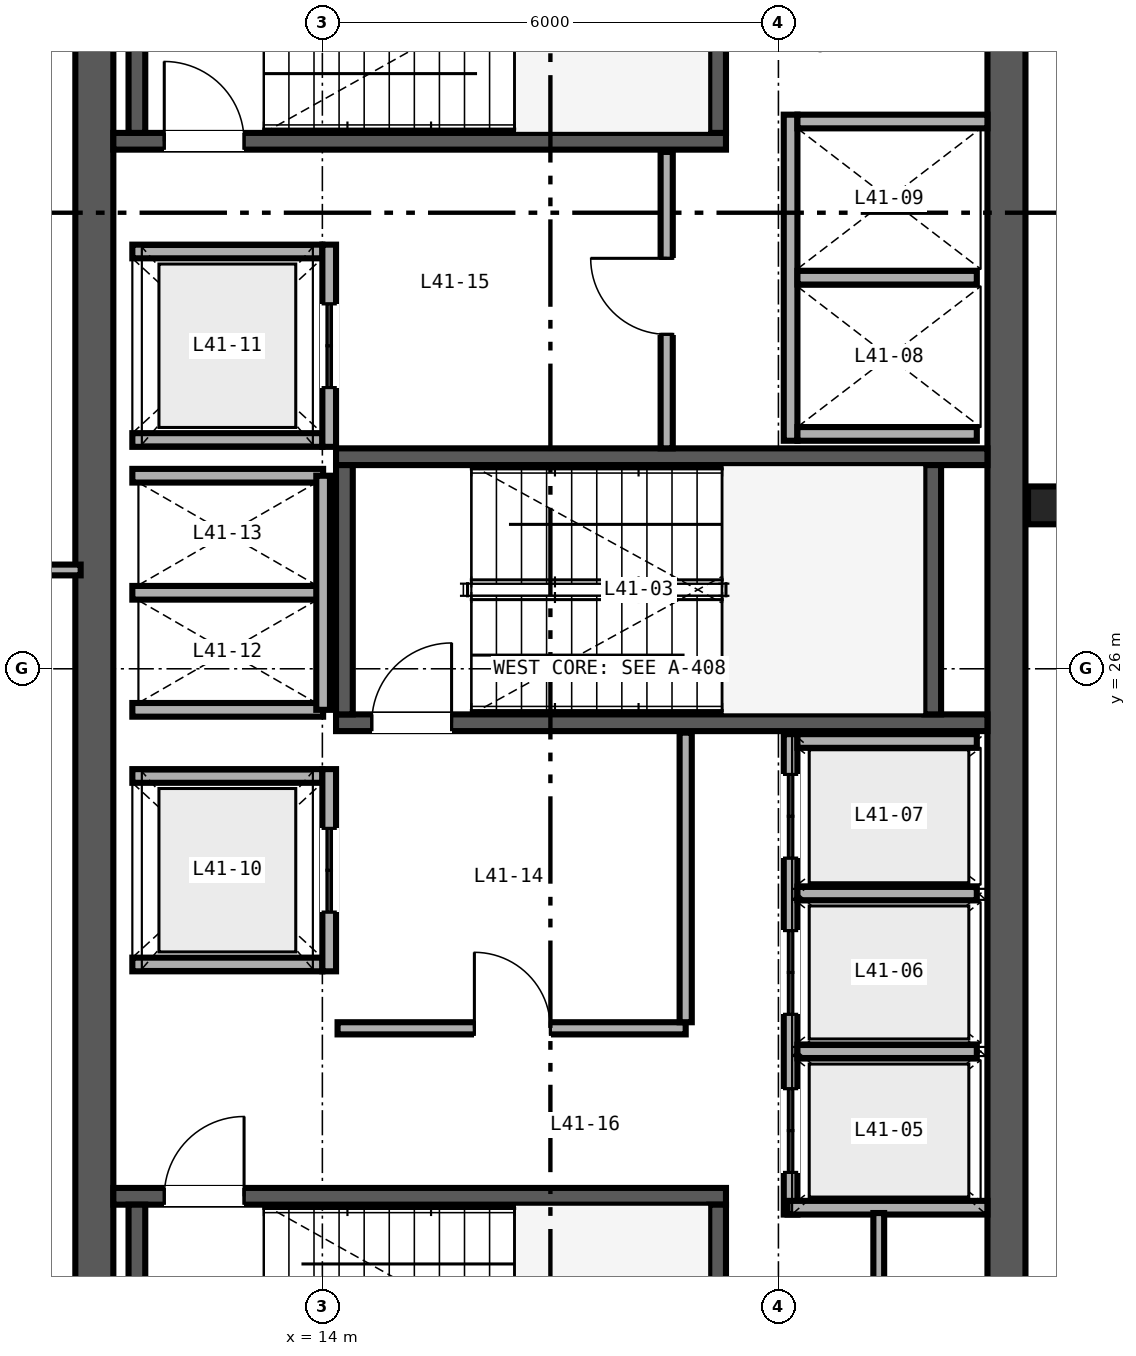
"""IFC4 building model, lengths in metres.
Left out: names, types, materials, properties, quantities, classifications, styles, units other than length and angle.
Written with IfcOpenShell. Run it as: python <this file> out.ifc"""

import sys

from ifc_helpers import new_model, si_unit, direction, frame, frame_2d, origin, origin_2d, place, context, subcontext, project, spatial, rectangle, i_section, extrude, source, transform, mapped, element, fill, save


model = new_model("IFC4")
c1 = context("Model", 3, precision=1e-05, world=origin(), true_north=direction((0.0, 1.0)))
c2 = subcontext(c1, "Body", "Model", "MODEL_VIEW")
j1 = project(units=[si_unit("LENGTHUNIT", "METRE"), si_unit("PLANEANGLEUNIT", "RADIAN")], contexts=[c1])
p1 = place(None, origin())
s1 = spatial("IfcSite", under=j1, at=p1, CompositionType="ELEMENT")
p2 = place(p1, origin())
s2 = spatial("IfcBuilding", under=s1, at=p2, CompositionType="ELEMENT")
p3 = place(p2, frame((0.0, 0.0, 166.8)))
s3 = spatial("IfcBuildingStorey", under=s2, at=p3, CompositionType="ELEMENT", Elevation=166.8)
for number, where, z_axis, x_axis in (
    (1, (11.0, 15.25, 0.0), (0.0, 0.0, 1.0), (0.0, 1.0, 0.0)),
    (2, (23.0, 15.25, 0.0), (0.0, 0.0, 1.0), (0.0, 1.0, 0.0)),
):
    element("IfcWall", number, at=place(p3, frame(where, z_axis=z_axis, x_axis=x_axis)), inside=s3, PredefinedType="SHEAR", context=c2, shape_type="SweptSolid", body=[
        extrude(rectangle(XDim=21.5, YDim=0.5, at=frame_2d((10.75, 0.0))), origin(), (0.0, 0.0, 1.0), 3.37),
    ])
p4 = place(p3, frame((11.25, 19.06, 0.0), z_axis=(0.0, 0.0, 1.0), x_axis=(1.0, 0.0, 0.0)))
e3 = element("IfcWall", 3, at=p4, inside=s3, PredefinedType="SHEAR", context=c2, shape_type="SweptSolid", body=[
    extrude(rectangle(XDim=8.06, YDim=0.22, at=frame_2d((4.03, 0.0))), origin(), (0.0, 0.0, 1.0), 3.4),
])
p5 = place(p4, frame((0.67, 0.0, 0.0)))
e4 = element("IfcOpeningElement", 4, at=p5, cuts=e3, PredefinedType="OPENING", context=c2, shape_type="SweptSolid", body=[
    extrude(rectangle(XDim=1.05, YDim=2.15, at=frame_2d((0.525, 1.075))), frame((0.0, 0.12, 0.0), z_axis=(0.0, -1.0, 0.0), x_axis=(1.0, 0.0, 0.0)), (0.0, 0.0, 1.0), 0.24),
])
for number, where, z_axis, x_axis in (
    (5, (11.56, 15.67, 0.0), (0.0, 0.0, 1.0), (0.0, 1.0, 0.0)),
    (6, (19.2, 15.67, 0.0), (0.0, 0.0, 1.0), (0.0, 1.0, 0.0)),
):
    element("IfcWall", number, at=place(p3, frame(where, z_axis=z_axis, x_axis=x_axis)), inside=s3, PredefinedType="SHEAR", context=c2, shape_type="SweptSolid", body=[
        extrude(rectangle(XDim=3.28, YDim=0.22, at=frame_2d((1.64, 0.0))), origin(), (0.0, 0.0, 1.0), 3.4),
    ])
p6 = place(p3, frame((11.25, 32.94, 0.0), z_axis=(0.0, 0.0, 1.0), x_axis=(1.0, 0.0, 0.0)))
e7 = element("IfcWall", 7, at=p6, inside=s3, PredefinedType="SHEAR", context=c2, shape_type="SweptSolid", body=[
    extrude(rectangle(XDim=8.06, YDim=0.22, at=frame_2d((4.03, 0.0))), origin(), (0.0, 0.0, 1.0), 3.4),
])
p7 = place(p6, frame((0.67, 0.0, 0.0)))
e8 = element("IfcOpeningElement", 8, at=p7, cuts=e7, PredefinedType="OPENING", context=c2, shape_type="SweptSolid", body=[
    extrude(rectangle(XDim=1.05, YDim=2.15, at=frame_2d((0.525, 1.075))), frame((0.0, 0.12, 0.0), z_axis=(0.0, -1.0, 0.0), x_axis=(1.0, 0.0, 0.0)), (0.0, 0.0, 1.0), 0.24),
])
for number, where, z_axis, x_axis in (
    (9, (11.56, 33.05, 0.0), (0.0, 0.0, 1.0), (0.0, 1.0, 0.0)),
    (10, (19.2, 33.05, 0.0), (0.0, 0.0, 1.0), (0.0, 1.0, 0.0)),
):
    element("IfcWall", number, at=place(p3, frame(where, z_axis=z_axis, x_axis=x_axis)), inside=s3, PredefinedType="SHEAR", context=c2, shape_type="SweptSolid", body=[
        extrude(rectangle(XDim=3.28, YDim=0.22, at=frame_2d((1.64, 0.0))), origin(), (0.0, 0.0, 1.0), 3.4),
    ])
p8 = place(p3, frame((14.18, 25.29, 0.0), z_axis=(0.0, 0.0, 1.0), x_axis=(1.0, 0.0, 0.0)))
e11 = element("IfcWall", 11, at=p8, inside=s3, PredefinedType="SHEAR", context=c2, shape_type="SweptSolid", body=[
    extrude(rectangle(XDim=8.57, YDim=0.22, at=frame_2d((4.285, 0.0))), origin(), (0.0, 0.0, 1.0), 3.4),
])
p9 = place(p8, frame((0.47, 0.0, 0.0)))
e12 = element("IfcOpeningElement", 12, at=p9, cuts=e11, PredefinedType="OPENING", context=c2, shape_type="SweptSolid", body=[
    extrude(rectangle(XDim=1.05, YDim=2.15, at=frame_2d((0.525, 1.075))), frame((0.0, 0.12, 0.0), z_axis=(0.0, -1.0, 0.0), x_axis=(1.0, 0.0, 0.0)), (0.0, 0.0, 1.0), 0.24),
])
p10 = place(p3, frame((14.18, 28.79, 0.0), z_axis=(0.0, 0.0, 1.0), x_axis=(1.0, 0.0, 0.0)))
e13 = element("IfcWall", 13, at=p10, inside=s3, PredefinedType="SHEAR", context=c2, shape_type="SweptSolid", body=[
    extrude(rectangle(XDim=8.57, YDim=0.22, at=frame_2d((4.285, 0.0))), origin(), (0.0, 0.0, 1.0), 3.4),
])
for number, where, z_axis, x_axis in (
    (14, (14.29, 25.4, 0.0), (0.0, 0.0, 1.0), (0.0, 1.0, 0.0)),
    (15, (22.03, 25.4, 0.0), (0.0, 0.0, 1.0), (0.0, 1.0, 0.0)),
):
    element("IfcWall", number, at=place(p3, frame(where, z_axis=z_axis, x_axis=x_axis)), inside=s3, PredefinedType="SHEAR", context=c2, shape_type="SweptSolid", body=[
        extrude(rectangle(XDim=3.28, YDim=0.22, at=frame_2d((1.64, 0.0))), origin(), (0.0, 0.0, 1.0), 3.4),
    ])
m1 = source(origin(), c2, "Body", "SweptSolid", [
    extrude(i_section(OverallWidth=0.432, OverallDepth=0.498, WebThickness=0.056, FlangeThickness=0.089, FilletRadius=0.025, at=origin_2d()), origin(), (0.0, 0.0, 1.0), 3.37),
])
p11 = place(p3, frame((23.5, 28.15, 0.0), z_axis=(0.0, 0.0, 1.0), x_axis=(1.0, 0.0, 0.0)))
e16 = element("IfcColumn", 16, at=p11, inside=s3, PredefinedType="COLUMN", context=c2, shape_type="MappedRepresentation", body=[
    mapped(m1, transform((0.0, 0.0, 0.0), scale=1.0)),
])
p12 = place(p3, frame((20.16, 18.82, 0.0), z_axis=(0.0, 0.0, 1.0), x_axis=(0.0, 1.0, 0.0)))
e17 = element("IfcWall", 17, at=p12, inside=s3, PredefinedType="SOLIDWALL", context=c2, shape_type="SweptSolid", body=[
    extrude(rectangle(XDim=6.32, YDim=0.18, at=frame_2d((3.16, 0.0))), origin(), (0.0, 0.0, 1.0), 2.47),
])
p13 = place(p12, frame((0.555, 0.0, 0.0)))
e18 = element("IfcOpeningElement", 18, at=p13, cuts=e17, PredefinedType="OPENING", context=c2, shape_type="SweptSolid", body=[
    extrude(rectangle(XDim=1.1, YDim=2.2, at=frame_2d((0.55, 1.1))), frame((0.0, 0.1, 0.0), z_axis=(0.0, -1.0, 0.0), x_axis=(1.0, 0.0, 0.0)), (0.0, 0.0, 1.0), 0.2),
])
p14 = place(p12, frame((2.635, 0.0, 0.0)))
e19 = element("IfcOpeningElement", 19, at=p14, cuts=e17, PredefinedType="OPENING", context=c2, shape_type="SweptSolid", body=[
    extrude(rectangle(XDim=1.1, YDim=2.2, at=frame_2d((0.55, 1.1))), frame((0.0, 0.1, 0.0), z_axis=(0.0, -1.0, 0.0), x_axis=(1.0, 0.0, 0.0)), (0.0, 0.0, 1.0), 0.2),
])
p15 = place(p12, frame((4.69, 0.0, 0.0)))
e20 = element("IfcOpeningElement", 20, at=p15, cuts=e17, PredefinedType="OPENING", context=c2, shape_type="SweptSolid", body=[
    extrude(rectangle(XDim=1.1, YDim=2.2, at=frame_2d((0.55, 1.1))), frame((0.0, 0.1, 0.0), z_axis=(0.0, -1.0, 0.0), x_axis=(1.0, 0.0, 0.0)), (0.0, 0.0, 1.0), 0.2),
])
p16 = place(p3, frame((20.12, 18.91, 0.0), z_axis=(0.0, 0.0, 1.0), x_axis=(1.0, 0.0, 0.0)))
e21 = element("IfcWall", 21, at=p16, inside=s3, PredefinedType="SOLIDWALL", context=c2, shape_type="SweptSolid", body=[
    extrude(rectangle(XDim=2.63, YDim=0.18, at=frame_2d((1.315, 0.0))), origin(), (0.0, 0.0, 1.0), 3.37),
])
p17 = place(p3, frame((20.25, 25.05, 0.0), z_axis=(0.0, 0.0, 1.0), x_axis=(1.0, 0.0, 0.0)))
e22 = element("IfcWall", 22, at=p17, inside=s3, PredefinedType="SOLIDWALL", context=c2, shape_type="SweptSolid", body=[
    extrude(rectangle(XDim=2.36, YDim=0.18, at=frame_2d((1.18, 0.0))), origin(), (0.0, 0.0, 1.0), 3.37),
])
p18 = place(p3, frame((20.25, 20.965, 0.0), z_axis=(0.0, 0.0, 1.0), x_axis=(1.0, 0.0, 0.0)))
e23 = element("IfcWall", 23, at=p18, inside=s3, PredefinedType="SOLIDWALL", context=c2, shape_type="SweptSolid", body=[
    extrude(rectangle(XDim=2.36, YDim=0.18, at=frame_2d((1.18, 0.0))), origin(), (0.0, 0.0, 1.0), 2.47),
])
p19 = place(p3, frame((20.25, 23.045, 0.0), z_axis=(0.0, 0.0, 1.0), x_axis=(1.0, 0.0, 0.0)))
e24 = element("IfcWall", 24, at=p19, inside=s3, PredefinedType="SOLIDWALL", context=c2, shape_type="SweptSolid", body=[
    extrude(rectangle(XDim=2.36, YDim=0.18, at=frame_2d((1.18, 0.0))), origin(), (0.0, 0.0, 1.0), 3.37),
])
p20 = place(p3, frame((20.16, 29.0, 0.0), z_axis=(0.0, 0.0, 1.0), x_axis=(0.0, 1.0, 0.0)))
e25 = element("IfcWall", 25, at=p20, inside=s3, PredefinedType="SOLIDWALL", context=c2, shape_type="SweptSolid", body=[
    extrude(rectangle(XDim=4.29, YDim=0.18, at=frame_2d((2.145, 0.0))), origin(), (0.0, 0.0, 1.0), 3.37),
])
p21 = place(p3, frame((20.25, 29.09, 0.0), z_axis=(0.0, 0.0, 1.0), x_axis=(1.0, 0.0, 0.0)))
e26 = element("IfcWall", 26, at=p21, inside=s3, PredefinedType="SOLIDWALL", context=c2, shape_type="SweptSolid", body=[
    extrude(rectangle(XDim=2.36, YDim=0.18, at=frame_2d((1.18, 0.0))), origin(), (0.0, 0.0, 1.0), 3.37),
])
p22 = place(p3, frame((20.25, 33.2, 0.0), z_axis=(0.0, 0.0, 1.0), x_axis=(1.0, 0.0, 0.0)))
e27 = element("IfcWall", 27, at=p22, inside=s3, PredefinedType="SOLIDWALL", context=c2, shape_type="SweptSolid", body=[
    extrude(rectangle(XDim=2.5, YDim=0.18, at=frame_2d((1.25, 0.0))), origin(), (0.0, 0.0, 1.0), 3.37),
])
p23 = place(p3, frame((20.25, 31.145, 0.0), z_axis=(0.0, 0.0, 1.0), x_axis=(1.0, 0.0, 0.0)))
e28 = element("IfcWall", 28, at=p23, inside=s3, PredefinedType="SOLIDWALL", context=c2, shape_type="SweptSolid", body=[
    extrude(rectangle(XDim=2.36, YDim=0.18, at=frame_2d((1.18, 0.0))), origin(), (0.0, 0.0, 1.0), 3.37),
])
for number, where, z_axis, x_axis in (
    (29, (11.5, 22.11, 0.0), (0.0, 0.0, 1.0), (1.0, 0.0, 0.0)),
    (30, (11.5, 24.59, 0.0), (0.0, 0.0, 1.0), (1.0, 0.0, 0.0)),
):
    element("IfcWall", number, at=place(p3, frame(where, z_axis=z_axis, x_axis=x_axis)), inside=s3, PredefinedType="SOLIDWALL", context=c2, shape_type="SweptSolid", body=[
        extrude(rectangle(XDim=2.5, YDim=0.18, at=frame_2d((1.25, 0.0))), origin(), (0.0, 0.0, 1.0), 3.37),
    ])
p24 = place(p3, frame((14.09, 22.02, 0.0), z_axis=(0.0, 0.0, 1.0), x_axis=(0.0, 1.0, 0.0)))
e31 = element("IfcWall", 31, at=p24, inside=s3, PredefinedType="SOLIDWALL", context=c2, shape_type="SweptSolid", body=[
    extrude(rectangle(XDim=2.66, YDim=0.18, at=frame_2d((1.33, 0.0))), origin(), (0.0, 0.0, 1.0), 3.37),
])
p25 = place(p24, frame((0.78, 0.0, 0.0)))
e32 = element("IfcOpeningElement", 32, at=p25, cuts=e31, PredefinedType="OPENING", context=c2, shape_type="SweptSolid", body=[
    extrude(rectangle(XDim=1.1, YDim=2.2, at=frame_2d((0.55, 1.1))), frame((0.0, 0.1, 0.0), z_axis=(0.0, -1.0, 0.0), x_axis=(1.0, 0.0, 0.0)), (0.0, 0.0, 1.0), 0.2),
])
for number, where, z_axis, x_axis in (
    (33, (11.5, 29.01, 0.0), (0.0, 0.0, 1.0), (1.0, 0.0, 0.0)),
    (34, (11.5, 31.49, 0.0), (0.0, 0.0, 1.0), (1.0, 0.0, 0.0)),
):
    element("IfcWall", number, at=place(p3, frame(where, z_axis=z_axis, x_axis=x_axis)), inside=s3, PredefinedType="SOLIDWALL", context=c2, shape_type="SweptSolid", body=[
        extrude(rectangle(XDim=2.5, YDim=0.18, at=frame_2d((1.25, 0.0))), origin(), (0.0, 0.0, 1.0), 3.37),
    ])
p26 = place(p3, frame((14.09, 28.92, 0.0), z_axis=(0.0, 0.0, 1.0), x_axis=(0.0, 1.0, 0.0)))
e35 = element("IfcWall", 35, at=p26, inside=s3, PredefinedType="SOLIDWALL", context=c2, shape_type="SweptSolid", body=[
    extrude(rectangle(XDim=2.66, YDim=0.18, at=frame_2d((1.33, 0.0))), origin(), (0.0, 0.0, 1.0), 3.37),
])
p27 = place(p26, frame((0.78, 0.0, 0.0)))
e36 = element("IfcOpeningElement", 36, at=p27, cuts=e35, PredefinedType="OPENING", context=c2, shape_type="SweptSolid", body=[
    extrude(rectangle(XDim=1.1, YDim=2.2, at=frame_2d((0.55, 1.1))), frame((0.0, 0.1, 0.0), z_axis=(0.0, -1.0, 0.0), x_axis=(1.0, 0.0, 0.0)), (0.0, 0.0, 1.0), 0.2),
])
for number, where, z_axis, x_axis in (
    (37, (11.5, 25.46, 0.0), (0.0, 0.0, 1.0), (1.0, 0.0, 0.0)),
    (38, (11.5, 27.0, 0.0), (0.0, 0.0, 1.0), (1.0, 0.0, 0.0)),
    (39, (11.5, 28.54, 0.0), (0.0, 0.0, 1.0), (1.0, 0.0, 0.0)),
):
    element("IfcWall", number, at=place(p3, frame(where, z_axis=z_axis, x_axis=x_axis)), inside=s3, PredefinedType="SOLIDWALL", context=c2, shape_type="SweptSolid", body=[
        extrude(rectangle(XDim=2.51, YDim=0.18, at=frame_2d((1.255, 0.0))), origin(), (0.0, 0.0, 1.0), 3.37),
    ])
p28 = place(p3, frame((14.01, 25.46, 0.0), z_axis=(0.0, 0.0, 1.0), x_axis=(0.0, 1.0, 0.0)))
e40 = element("IfcWall", 40, at=p28, inside=s3, PredefinedType="SOLIDWALL", context=c2, shape_type="SweptSolid", body=[
    extrude(rectangle(XDim=3.08, YDim=0.18, at=frame_2d((1.54, 0.0))), origin(), (0.0, 0.0, 1.0), 3.37),
])
p29 = place(p3, frame((14.2, 21.27, 0.0), z_axis=(0.0, 0.0, 1.0), x_axis=(1.0, 0.0, 0.0)))
e41 = element("IfcWall", 41, at=p29, inside=s3, PredefinedType="PARTITIONING", context=c2, shape_type="SweptSolid", body=[
    extrude(rectangle(XDim=4.58, YDim=0.16, at=frame_2d((2.29, 0.0))), origin(), (0.0, 0.0, 1.0), 3.37),
])
p30 = place(p29, frame((1.8, 0.0, 0.0)))
e42 = element("IfcOpeningElement", 42, at=p30, cuts=e41, PredefinedType="OPENING", context=c2, shape_type="SweptSolid", body=[
    extrude(rectangle(XDim=1.0, YDim=2.15, at=frame_2d((0.5, 1.075))), frame((0.0, 0.09, 0.0), z_axis=(0.0, -1.0, 0.0), x_axis=(1.0, 0.0, 0.0)), (0.0, 0.0, 1.0), 0.18),
])
p31 = place(p3, frame((18.78, 21.35, 0.0), z_axis=(0.0, 0.0, 1.0), x_axis=(0.0, 1.0, 0.0)))
e43 = element("IfcWall", 43, at=p31, inside=s3, PredefinedType="PARTITIONING", context=c2, shape_type="SweptSolid", body=[
    extrude(rectangle(XDim=3.81, YDim=0.16, at=frame_2d((1.905, 0.0))), origin(), (0.0, 0.0, 1.0), 3.37),
])
p32 = place(p3, frame((18.53, 28.9, 0.0), z_axis=(0.0, 0.0, 1.0), x_axis=(0.0, 1.0, 0.0)))
e44 = element("IfcWall", 44, at=p32, inside=s3, PredefinedType="PARTITIONING", context=c2, shape_type="SweptSolid", body=[
    extrude(rectangle(XDim=3.9, YDim=0.16, at=frame_2d((1.95, 0.0))), origin(), (0.0, 0.0, 1.0), 3.37),
])
p33 = place(p32, frame((1.5, 0.0, 0.0)))
e45 = element("IfcOpeningElement", 45, at=p33, cuts=e44, PredefinedType="OPENING", context=c2, shape_type="SweptSolid", body=[
    extrude(rectangle(XDim=1.0, YDim=2.15, at=frame_2d((0.5, 1.075))), frame((0.0, 0.09, 0.0), z_axis=(0.0, -1.0, 0.0), x_axis=(1.0, 0.0, 0.0)), (0.0, 0.0, 1.0), 0.18),
])
p34 = place(p3, frame((21.32, 15.25, 0.0), z_axis=(0.0, 0.0, 1.0), x_axis=(0.0, 1.0, 0.0)))
e46 = element("IfcWall", 46, at=p34, inside=s3, PredefinedType="PARTITIONING", context=c2, shape_type="SweptSolid", body=[
    extrude(rectangle(XDim=3.59, YDim=0.142, at=frame_2d((1.795, 0.0))), origin(), (0.0, 0.0, 1.0), 3.37),
])
p35 = place(p34, frame((1.25, 0.0, 0.0)))
e47 = element("IfcOpeningElement", 47, at=p35, cuts=e46, PredefinedType="OPENING", context=c2, shape_type="SweptSolid", body=[
    extrude(rectangle(XDim=0.84, YDim=2.1, at=frame_2d((0.42, 1.05))), frame((0.0, 0.081, 0.0), z_axis=(0.0, -1.0, 0.0), x_axis=(1.0, 0.0, 0.0)), (0.0, 0.0, 1.0), 0.162),
])
p36 = place(p3, frame((8.16, 27.3, 0.0), z_axis=(0.0, 0.0, 1.0), x_axis=(1.0, 0.0, 0.0)))
e48 = element("IfcWall", 48, at=p36, inside=s3, PredefinedType="PARTITIONING", context=c2, shape_type="SweptSolid", body=[
    extrude(rectangle(XDim=2.66, YDim=0.142, at=frame_2d((1.33, 0.0))), origin(), (0.0, 0.0, 1.0), 2.591),
])
m2 = source(origin(), c2, "Body", "SweptSolid", [
    extrude(rectangle(XDim=1.05, YDim=2.15, at=frame_2d((0.525, 1.075))), frame((0.0, 0.025, 0.0), z_axis=(0.0, -1.0, 0.0), x_axis=(1.0, 0.0, 0.0)), (0.0, 0.0, 1.0), 0.05),
])
p37 = place(p5, origin())
e49 = element("IfcDoor", 49, at=p37, inside=s3, OperationType="SINGLE_SWING_RIGHT", PredefinedType="DOOR", context=c2, shape_type="MappedRepresentation", body=[
    mapped(m2, transform((0.0, 0.0, 0.0), scale=1.0)),
])
fill(e4, e49)
p38 = place(p7, origin())
e50 = element("IfcDoor", 50, at=p38, inside=s3, OperationType="SINGLE_SWING_LEFT", PredefinedType="DOOR", context=c2, shape_type="MappedRepresentation", body=[
    mapped(m2, transform((0.0, 0.0, 0.0), scale=1.0)),
])
fill(e8, e50)
p39 = place(p9, origin())
e51 = element("IfcDoor", 51, at=p39, inside=s3, OperationType="SINGLE_SWING_RIGHT", PredefinedType="DOOR", context=c2, shape_type="MappedRepresentation", body=[
    mapped(m2, transform((0.0, 0.0, 0.0), scale=1.0)),
])
fill(e12, e51)
m3 = source(origin(), c2, "Body", "SweptSolid", [
    extrude(rectangle(XDim=1.1, YDim=2.2, at=frame_2d((0.55, 1.1))), frame((0.0, 0.025, 0.0), z_axis=(0.0, -1.0, 0.0), x_axis=(1.0, 0.0, 0.0)), (0.0, 0.0, 1.0), 0.05),
])
p40 = place(p13, origin())
e52 = element("IfcDoor", 52, at=p40, inside=s3, OperationType="DOUBLE_DOOR_SLIDING", PredefinedType="DOOR", context=c2, shape_type="MappedRepresentation", body=[
    mapped(m3, transform((0.0, 0.0, 0.0), scale=1.0)),
])
fill(e18, e52)
p41 = place(p14, origin())
e53 = element("IfcDoor", 53, at=p41, inside=s3, OperationType="DOUBLE_DOOR_SLIDING", PredefinedType="DOOR", context=c2, shape_type="MappedRepresentation", body=[
    mapped(m3, transform((0.0, 0.0, 0.0), scale=1.0)),
])
fill(e19, e53)
p42 = place(p15, origin())
e54 = element("IfcDoor", 54, at=p42, inside=s3, OperationType="DOUBLE_DOOR_SLIDING", PredefinedType="DOOR", context=c2, shape_type="MappedRepresentation", body=[
    mapped(m3, transform((0.0, 0.0, 0.0), scale=1.0)),
])
fill(e20, e54)
p43 = place(p25, origin())
e55 = element("IfcDoor", 55, at=p43, inside=s3, OperationType="DOUBLE_DOOR_SLIDING", PredefinedType="DOOR", context=c2, shape_type="MappedRepresentation", body=[
    mapped(m3, transform((0.0, 0.0, 0.0), scale=1.0)),
])
fill(e32, e55)
p44 = place(p27, origin())
e56 = element("IfcDoor", 56, at=p44, inside=s3, OperationType="DOUBLE_DOOR_SLIDING", PredefinedType="DOOR", context=c2, shape_type="MappedRepresentation", body=[
    mapped(m3, transform((0.0, 0.0, 0.0), scale=1.0)),
])
fill(e36, e56)
m4 = source(origin(), c2, "Body", "SweptSolid", [
    extrude(rectangle(XDim=1.0, YDim=2.15, at=frame_2d((0.5, 1.075))), frame((0.0, 0.025, 0.0), z_axis=(0.0, -1.0, 0.0), x_axis=(1.0, 0.0, 0.0)), (0.0, 0.0, 1.0), 0.05),
])
p45 = place(p30, origin())
e57 = element("IfcDoor", 57, at=p45, inside=s3, OperationType="SINGLE_SWING_LEFT", PredefinedType="DOOR", context=c2, shape_type="MappedRepresentation", body=[
    mapped(m4, transform((0.0, 0.0, 0.0), scale=1.0)),
])
fill(e42, e57)
p46 = place(p33, origin())
e58 = element("IfcDoor", 58, at=p46, inside=s3, OperationType="SINGLE_SWING_RIGHT", PredefinedType="DOOR", context=c2, shape_type="MappedRepresentation", body=[
    mapped(m4, transform((0.0, 0.0, 0.0), scale=1.0)),
])
fill(e45, e58)
save(model, sys.argv[1])
